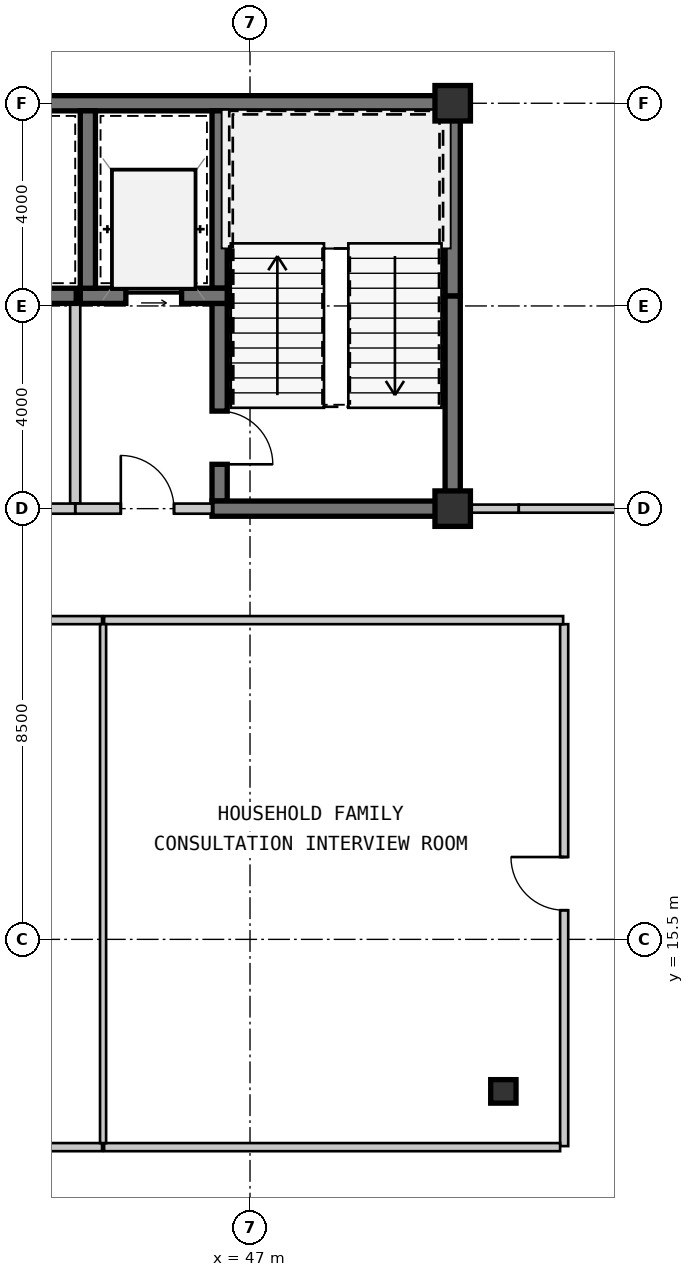
"""IFC4 building model, lengths in metres.
Left out: names, types, materials, properties, quantities, classifications, styles, units other than length and angle.
Written with IfcOpenShell. Run it as: python <this file> out.ifc"""

import sys

from ifc_helpers import new_model, si_unit, direction, frame, frame_2d, origin, origin_2d, place, context, subcontext, project, spatial, rectangle, i_section, extrude, source, transform, mapped, element, fill, save


model = new_model("IFC4")
c1 = context("Model", 3, precision=1e-05, world=origin(), true_north=direction((0.0, 1.0)))
c2 = subcontext(c1, "Body", "Model", "MODEL_VIEW")
j1 = project(units=[si_unit("LENGTHUNIT", "METRE"), si_unit("PLANEANGLEUNIT", "RADIAN")], contexts=[c1])
p1 = place(None, origin())
s1 = spatial("IfcSite", under=j1, at=p1, CompositionType="ELEMENT")
p2 = place(p1, origin())
s2 = spatial("IfcBuilding", under=s1, at=p2, CompositionType="ELEMENT")
p3 = place(p2, frame((0.0, 0.0, 68.25)))
s3 = spatial("IfcBuildingStorey", under=s2, at=p3, CompositionType="ELEMENT", Elevation=68.25)
m1 = source(origin(), c2, "Body", "SweptSolid", [
    extrude(rectangle(XDim=0.7, YDim=0.7, at=origin_2d()), origin(), (0.0, 0.0, 1.0), 3.15),
])
for number, where, z_axis, x_axis in (
    (1, (51.0, 24.0, 0.0), (0.0, 0.0, 1.0), (1.0, 0.0, 0.0)),
    (2, (51.0, 32.0, 0.0), (0.0, 0.0, 1.0), (1.0, 0.0, 0.0)),
):
    element("IfcColumn", number, at=place(p3, frame(where, z_axis=z_axis, x_axis=x_axis)), inside=s3, PredefinedType="COLUMN", context=c2, shape_type="MappedRepresentation", body=[
        mapped(m1, transform((0.0, 0.0, 0.0), scale=1.0)),
    ])
m2 = source(origin(), c2, "Body", "SweptSolid", [
    extrude(i_section(OverallWidth=0.5, OverallDepth=0.464, WebThickness=0.022, FlangeThickness=0.034, at=origin_2d()), origin(), (0.0, 0.0, 1.0), 3.15),
])
p4 = place(p3, frame((52.0, 12.5, 0.0), z_axis=(0.0, 0.0, 1.0), x_axis=(1.0, 0.0, 0.0)))
e3 = element("IfcColumn", 3, at=p4, inside=s3, PredefinedType="COLUMN", context=c2, shape_type="MappedRepresentation", body=[
    mapped(m2, transform((0.0, 0.0, 0.0), scale=1.0)),
])
m3 = source(origin(), c2, "Body", "SweptSolid", [
    extrude(rectangle(XDim=11.95, YDim=0.3, at=frame_2d((5.975, 0.0))), origin(), (0.0, 0.0, 1.0), 2.93),
])
p5 = place(p3, frame((39.2, 32.0, 0.0), z_axis=(0.0, 0.0, 1.0), x_axis=(1.0, 0.0, 0.0)))
e4 = element("IfcWall", 4, at=p5, inside=s3, PredefinedType="SHEAR", context=c2, shape_type="MappedRepresentation", body=[
    mapped(m3, transform((0.0, 0.0, 0.0), scale=1.0)),
])
m4 = source(origin(), c2, "Body", "SweptSolid", [
    extrude(rectangle(XDim=4.05, YDim=0.3, at=frame_2d((2.025, 0.0))), origin(), (0.0, 0.0, 1.0), 2.93),
])
p6 = place(p3, frame((51.0, 24.15, 0.0), z_axis=(0.0, 0.0, 1.0), x_axis=(0.0, 1.0, 0.0)))
e5 = element("IfcWall", 5, at=p6, inside=s3, PredefinedType="SHEAR", context=c2, shape_type="MappedRepresentation", body=[
    mapped(m4, transform((0.0, 0.0, 0.0), scale=1.0)),
])
m5 = source(origin(), c2, "Body", "SweptSolid", [
    extrude(rectangle(XDim=3.65, YDim=0.3, at=frame_2d((1.825, 0.0))), origin(), (0.0, 0.0, 1.0), 2.93),
])
p7 = place(p3, frame((51.0, 28.2, 0.0), z_axis=(0.0, 0.0, 1.0), x_axis=(0.0, 1.0, 0.0)))
e6 = element("IfcWall", 6, at=p7, inside=s3, PredefinedType="SHEAR", context=c2, shape_type="MappedRepresentation", body=[
    mapped(m5, transform((0.0, 0.0, 0.0), scale=1.0)),
])
m6 = source(origin(), c2, "Body", "SweptSolid", [
    extrude(rectangle(XDim=3.5, YDim=0.3, at=frame_2d((1.75, 0.0))), origin(), (0.0, 0.0, 1.0), 2.93),
])
p8 = place(p3, frame((46.4, 31.85, 0.0), z_axis=(0.0, 0.0, 1.0), x_axis=(0.0, -1.0, 0.0)))
e7 = element("IfcWall", 7, at=p8, inside=s3, PredefinedType="SHEAR", context=c2, shape_type="MappedRepresentation", body=[
    mapped(m6, transform((0.0, 0.0, 0.0), scale=1.0)),
])
m7 = source(origin(), c2, "Body", "SweptSolid", [
    extrude(rectangle(XDim=3.9, YDim=0.3, at=frame_2d((1.95, 0.0))), origin(), (0.0, 0.0, 1.0), 2.93),
])
p9 = place(p3, frame((46.4, 28.05, 0.0), z_axis=(0.0, 0.0, 1.0), x_axis=(0.0, -1.0, 0.0)))
e8 = element("IfcWall", 8, at=p9, inside=s3, PredefinedType="SHEAR", context=c2, shape_type="MappedRepresentation", body=[
    mapped(m7, transform((0.0, 0.0, 0.0), scale=1.0)),
])
m8 = source(origin(), c2, "Body", "SweptSolid", [
    extrude(rectangle(XDim=1.05, YDim=2.1, at=frame_2d((0.525, 1.05))), frame((0.0, 0.16, 0.0), z_axis=(0.0, -1.0, 0.0), x_axis=(1.0, 0.0, 0.0)), (0.0, 0.0, 1.0), 0.32),
])
p10 = place(p9, frame((2.125, 0.0, 0.0)))
e9 = element("IfcOpeningElement", 9, at=p10, cuts=e8, PredefinedType="OPENING", context=c2, shape_type="MappedRepresentation", body=[
    mapped(m8, transform((0.0, 0.0, 0.0), scale=1.0)),
])
m9 = source(origin(), c2, "Body", "SweptSolid", [
    extrude(rectangle(XDim=4.9, YDim=0.3, at=frame_2d((2.45, 0.0))), origin(), (0.0, 0.0, 1.0), 2.93),
])
p11 = place(p3, frame((46.25, 24.0, 0.0), z_axis=(0.0, 0.0, 1.0), x_axis=(1.0, 0.0, 0.0)))
e10 = element("IfcWall", 10, at=p11, inside=s3, PredefinedType="SHEAR", context=c2, shape_type="MappedRepresentation", body=[
    mapped(m9, transform((0.0, 0.0, 0.0), scale=1.0)),
])
m10 = source(origin(), c2, "Body", "SweptSolid", [
    extrude(rectangle(XDim=2.9, YDim=0.3, at=frame_2d((1.45, 0.0))), origin(), (0.0, 0.0, 1.0), 2.93),
])
p12 = place(p3, frame((43.65, 28.2, 0.0), z_axis=(0.0, 0.0, 1.0), x_axis=(1.0, 0.0, 0.0)))
e11 = element("IfcWall", 11, at=p12, inside=s3, PredefinedType="SHEAR", context=c2, shape_type="MappedRepresentation", body=[
    mapped(m10, transform((0.0, 0.0, 0.0), scale=1.0)),
])
m11 = source(origin(), c2, "Body", "SweptSolid", [
    extrude(rectangle(XDim=1.1, YDim=2.15, at=frame_2d((0.55, 1.075))), frame((0.0, 0.16, 0.0), z_axis=(0.0, -1.0, 0.0), x_axis=(1.0, 0.0, 0.0)), (0.0, 0.0, 1.0), 0.32),
])
p13 = place(p12, frame((0.9, 0.0, 0.0)))
e12 = element("IfcOpeningElement", 12, at=p13, cuts=e11, PredefinedType="OPENING", context=c2, shape_type="MappedRepresentation", body=[
    mapped(m11, transform((0.0, 0.0, 0.0), scale=1.0)),
])
p14 = place(p3, frame((43.8, 31.85, 0.0), z_axis=(0.0, 0.0, 1.0), x_axis=(0.0, -1.0, 0.0)))
e13 = element("IfcWall", 13, at=p14, inside=s3, PredefinedType="SHEAR", context=c2, shape_type="MappedRepresentation", body=[
    mapped(m6, transform((0.0, 0.0, 0.0), scale=1.0)),
])
m12 = source(origin(), c2, "Body", "SweptSolid", [
    extrude(rectangle(XDim=3.95, YDim=0.2, at=frame_2d((1.975, 0.0))), origin(), (0.0, 0.0, 1.0), 2.93),
])
p15 = place(p3, frame((43.55, 28.05, 0.0), z_axis=(0.0, 0.0, 1.0), x_axis=(0.0, -1.0, 0.0)))
e14 = element("IfcWall", 14, at=p15, inside=s3, PredefinedType="SOLIDWALL", context=c2, shape_type="MappedRepresentation", body=[
    mapped(m12, transform((0.0, 0.0, 0.0), scale=1.0)),
])
m13 = source(origin(), c2, "Body", "SweptSolid", [
    extrude(rectangle(XDim=2.7, YDim=0.2, at=frame_2d((1.35, 0.0))), origin(), (0.0, 0.0, 1.0), 2.397),
])
p16 = place(p3, frame((43.55, 24.0, 0.0), z_axis=(0.0, 0.0, 1.0), x_axis=(1.0, 0.0, 0.0)))
e15 = element("IfcWall", 15, at=p16, inside=s3, PredefinedType="SOLIDWALL", context=c2, shape_type="MappedRepresentation", body=[
    mapped(m13, transform((0.0, 0.0, 0.0), scale=1.0)),
])
m14 = source(origin(), c2, "Body", "SweptSolid", [
    extrude(rectangle(XDim=1.05, YDim=2.1, at=frame_2d((0.525, 1.05))), frame((0.0, 0.11, 0.0), z_axis=(0.0, -1.0, 0.0), x_axis=(1.0, 0.0, 0.0)), (0.0, 0.0, 1.0), 0.22),
])
p17 = place(p16, frame((0.9, 0.0, 0.0)))
e16 = element("IfcOpeningElement", 16, at=p17, cuts=e15, PredefinedType="OPENING", context=c2, shape_type="MappedRepresentation", body=[
    mapped(m14, transform((0.0, 0.0, 0.0), scale=1.0)),
])
m15 = source(origin(), c2, "Body", "SweptSolid", [
    extrude(rectangle(XDim=1.44, YDim=0.3, at=frame_2d((0.72, 0.0))), origin(), (0.0, 0.0, 1.0), 2.93),
])
p18 = place(p3, frame((42.13, 28.2, 0.0), z_axis=(0.0, 0.0, 1.0), x_axis=(1.0, 0.0, 0.0)))
e17 = element("IfcWall", 17, at=p18, inside=s3, PredefinedType="SHEAR", context=c2, shape_type="MappedRepresentation", body=[
    mapped(m15, transform((0.0, 0.0, 0.0), scale=1.0)),
])
m16 = source(origin(), c2, "Body", "SweptSolid", [
    extrude(rectangle(XDim=4.35, YDim=0.2, at=frame_2d((2.175, 0.0))), origin(), (0.0, 0.0, 1.0), 2.397),
])
p19 = place(p3, frame((43.55, 24.0, 0.0), z_axis=(0.0, 0.0, 1.0), x_axis=(-1.0, 0.0, 0.0)))
e18 = element("IfcWall", 18, at=p19, inside=s3, PredefinedType="SOLIDWALL", context=c2, shape_type="MappedRepresentation", body=[
    mapped(m16, transform((0.0, 0.0, 0.0), scale=1.0)),
])
p20 = place(p19, frame((2.4, 0.0, 0.0)))
e19 = element("IfcOpeningElement", 19, at=p20, cuts=e18, PredefinedType="OPENING", context=c2, shape_type="MappedRepresentation", body=[
    mapped(m14, transform((0.0, 0.0, 0.0), scale=1.0)),
])
m17 = source(origin(), c2, "Body", "SweptSolid", [
    extrude(rectangle(XDim=9.06, YDim=0.16, at=frame_2d((4.53, 0.0))), origin(), (0.0, 0.0, 1.0), 2.93),
])
p21 = place(p3, frame((44.08, 21.8, 0.0), z_axis=(0.0, 0.0, 1.0), x_axis=(-1.0, 0.0, 0.0)))
e20 = element("IfcWall", 20, at=p21, inside=s3, PredefinedType="PARTITIONING", context=c2, shape_type="MappedRepresentation", body=[
    mapped(m17, transform((0.0, 0.0, 0.0), scale=1.0)),
])
m18 = source(origin(), c2, "Body", "SweptSolid", [
    extrude(rectangle(XDim=1.05, YDim=2.1, at=frame_2d((0.525, 1.05))), frame((0.0, 0.09, 0.0), z_axis=(0.0, -1.0, 0.0), x_axis=(1.0, 0.0, 0.0)), (0.0, 0.0, 1.0), 0.18),
])
p22 = place(p21, frame((4.005, 0.0, 0.0)))
e21 = element("IfcOpeningElement", 21, at=p22, cuts=e20, PredefinedType="OPENING", context=c2, shape_type="MappedRepresentation", body=[
    mapped(m18, transform((0.0, 0.0, 0.0), scale=1.0)),
])
m19 = source(origin(), c2, "Body", "SweptSolid", [
    extrude(rectangle(XDim=10.3, YDim=0.16, at=frame_2d((5.15, 0.0))), origin(), (0.0, 0.0, 1.0), 2.93),
])
p23 = place(p3, frame((53.2, 11.42, 0.0), z_axis=(0.0, 0.0, 1.0), x_axis=(0.0, 1.0, 0.0)))
e22 = element("IfcWall", 22, at=p23, inside=s3, PredefinedType="PARTITIONING", context=c2, shape_type="MappedRepresentation", body=[
    mapped(m19, transform((0.0, 0.0, 0.0), scale=1.0)),
])
p24 = place(p23, frame((4.655, 0.0, 0.0)))
e23 = element("IfcOpeningElement", 23, at=p24, cuts=e22, PredefinedType="OPENING", context=c2, shape_type="MappedRepresentation", body=[
    mapped(m18, transform((0.0, 0.0, 0.0), scale=1.0)),
])
p25 = place(p3, frame((53.18, 21.8, 0.0), z_axis=(0.0, 0.0, 1.0), x_axis=(-1.0, 0.0, 0.0)))
e24 = element("IfcWall", 24, at=p25, inside=s3, PredefinedType="PARTITIONING", context=c2, shape_type="MappedRepresentation", body=[
    mapped(m17, transform((0.0, 0.0, 0.0), scale=1.0)),
])
m20 = source(origin(), c2, "Body", "SweptSolid", [
    extrude(rectangle(XDim=1.155, YDim=0.16, at=frame_2d((0.577, 0.0))), origin(), (0.0, 0.0, 1.0), 2.328),
])
p26 = place(p3, frame((51.15, 24.0, 0.0), z_axis=(0.0, 0.0, 1.0), x_axis=(1.0, 0.0, 0.0)))
e25 = element("IfcWall", 25, at=p26, inside=s3, PredefinedType="PARTITIONING", context=c2, shape_type="MappedRepresentation", body=[
    mapped(m20, transform((0.0, 0.0, 0.0), scale=1.0)),
])
m21 = source(origin(), c2, "Body", "SweptSolid", [
    extrude(rectangle(XDim=3.016, YDim=0.16, at=frame_2d((1.508, 0.0))), origin(), (0.0, 0.0, 1.0), 2.93),
])
p27 = place(p3, frame((52.304, 24.0, 0.0), z_axis=(0.0, 0.0, 1.0), x_axis=(1.0, 0.0, 0.0)))
e26 = element("IfcWall", 26, at=p27, inside=s3, PredefinedType="PARTITIONING", context=c2, shape_type="MappedRepresentation", body=[
    mapped(m21, transform((0.0, 0.0, 0.0), scale=1.0)),
])
p28 = place(p3, frame((35.02, 11.4, 0.0), z_axis=(0.0, 0.0, 1.0), x_axis=(1.0, 0.0, 0.0)))
e27 = element("IfcWall", 27, at=p28, inside=s3, PredefinedType="PARTITIONING", context=c2, shape_type="MappedRepresentation", body=[
    mapped(m17, transform((0.0, 0.0, 0.0), scale=1.0)),
])
m22 = source(origin(), c2, "Body", "SweptSolid", [
    extrude(rectangle(XDim=9.0, YDim=0.16, at=frame_2d((4.5, 0.0))), origin(), (0.0, 0.0, 1.0), 2.93),
])
p29 = place(p3, frame((44.12, 11.4, 0.0), z_axis=(0.0, 0.0, 1.0), x_axis=(1.0, 0.0, 0.0)))
e28 = element("IfcWall", 28, at=p29, inside=s3, PredefinedType="PARTITIONING", context=c2, shape_type="MappedRepresentation", body=[
    mapped(m22, transform((0.0, 0.0, 0.0), scale=1.0)),
])
m23 = source(origin(), c2, "Body", "SweptSolid", [
    extrude(rectangle(XDim=10.24, YDim=0.12, at=frame_2d((5.12, 0.0))), origin(), (0.0, 0.0, 1.0), 2.93),
])
p30 = place(p3, frame((44.1, 21.72, 0.0), z_axis=(0.0, 0.0, 1.0), x_axis=(0.0, -1.0, 0.0)))
e29 = element("IfcWall", 29, at=p30, inside=s3, PredefinedType="PARTITIONING", context=c2, shape_type="MappedRepresentation", body=[
    mapped(m23, transform((0.0, 0.0, 0.0), scale=1.0)),
])
m24 = source(origin(), c2, "Body", "SweptSolid", [
    extrude(rectangle(XDim=1.05, YDim=2.1, at=frame_2d((0.525, 1.05))), frame((0.0, 0.025, 0.0), z_axis=(0.0, -1.0, 0.0), x_axis=(1.0, 0.0, 0.0)), (0.0, 0.0, 1.0), 0.05),
])
p31 = place(p10, origin())
e30 = element("IfcDoor", 30, at=p31, inside=s3, OperationType="SINGLE_SWING_RIGHT", PredefinedType="DOOR", context=c2, shape_type="MappedRepresentation", body=[
    mapped(m24, transform((0.0, 0.0, 0.0), scale=1.0)),
])
fill(e9, e30)
m25 = source(origin(), c2, "Body", "SweptSolid", [
    extrude(rectangle(XDim=1.1, YDim=2.15, at=frame_2d((0.55, 1.075))), frame((0.0, 0.025, 0.0), z_axis=(0.0, -1.0, 0.0), x_axis=(1.0, 0.0, 0.0)), (0.0, 0.0, 1.0), 0.05),
])
p32 = place(p13, origin())
e31 = element("IfcDoor", 31, at=p32, inside=s3, OperationType="SLIDING_TO_LEFT", PredefinedType="DOOR", context=c2, shape_type="MappedRepresentation", body=[
    mapped(m25, transform((0.0, 0.0, 0.0), scale=1.0)),
])
fill(e12, e31)
p33 = place(p17, origin())
e32 = element("IfcDoor", 32, at=p33, inside=s3, OperationType="SINGLE_SWING_LEFT", PredefinedType="DOOR", context=c2, shape_type="MappedRepresentation", body=[
    mapped(m24, transform((0.0, 0.0, 0.0), scale=1.0)),
])
fill(e16, e32)
p34 = place(p24, origin())
e33 = element("IfcDoor", 33, at=p34, inside=s3, OperationType="SINGLE_SWING_RIGHT", PredefinedType="DOOR", context=c2, shape_type="MappedRepresentation", body=[
    mapped(m24, transform((0.0, 0.0, 0.0), scale=1.0)),
])
fill(e23, e33)
save(model, sys.argv[1])
